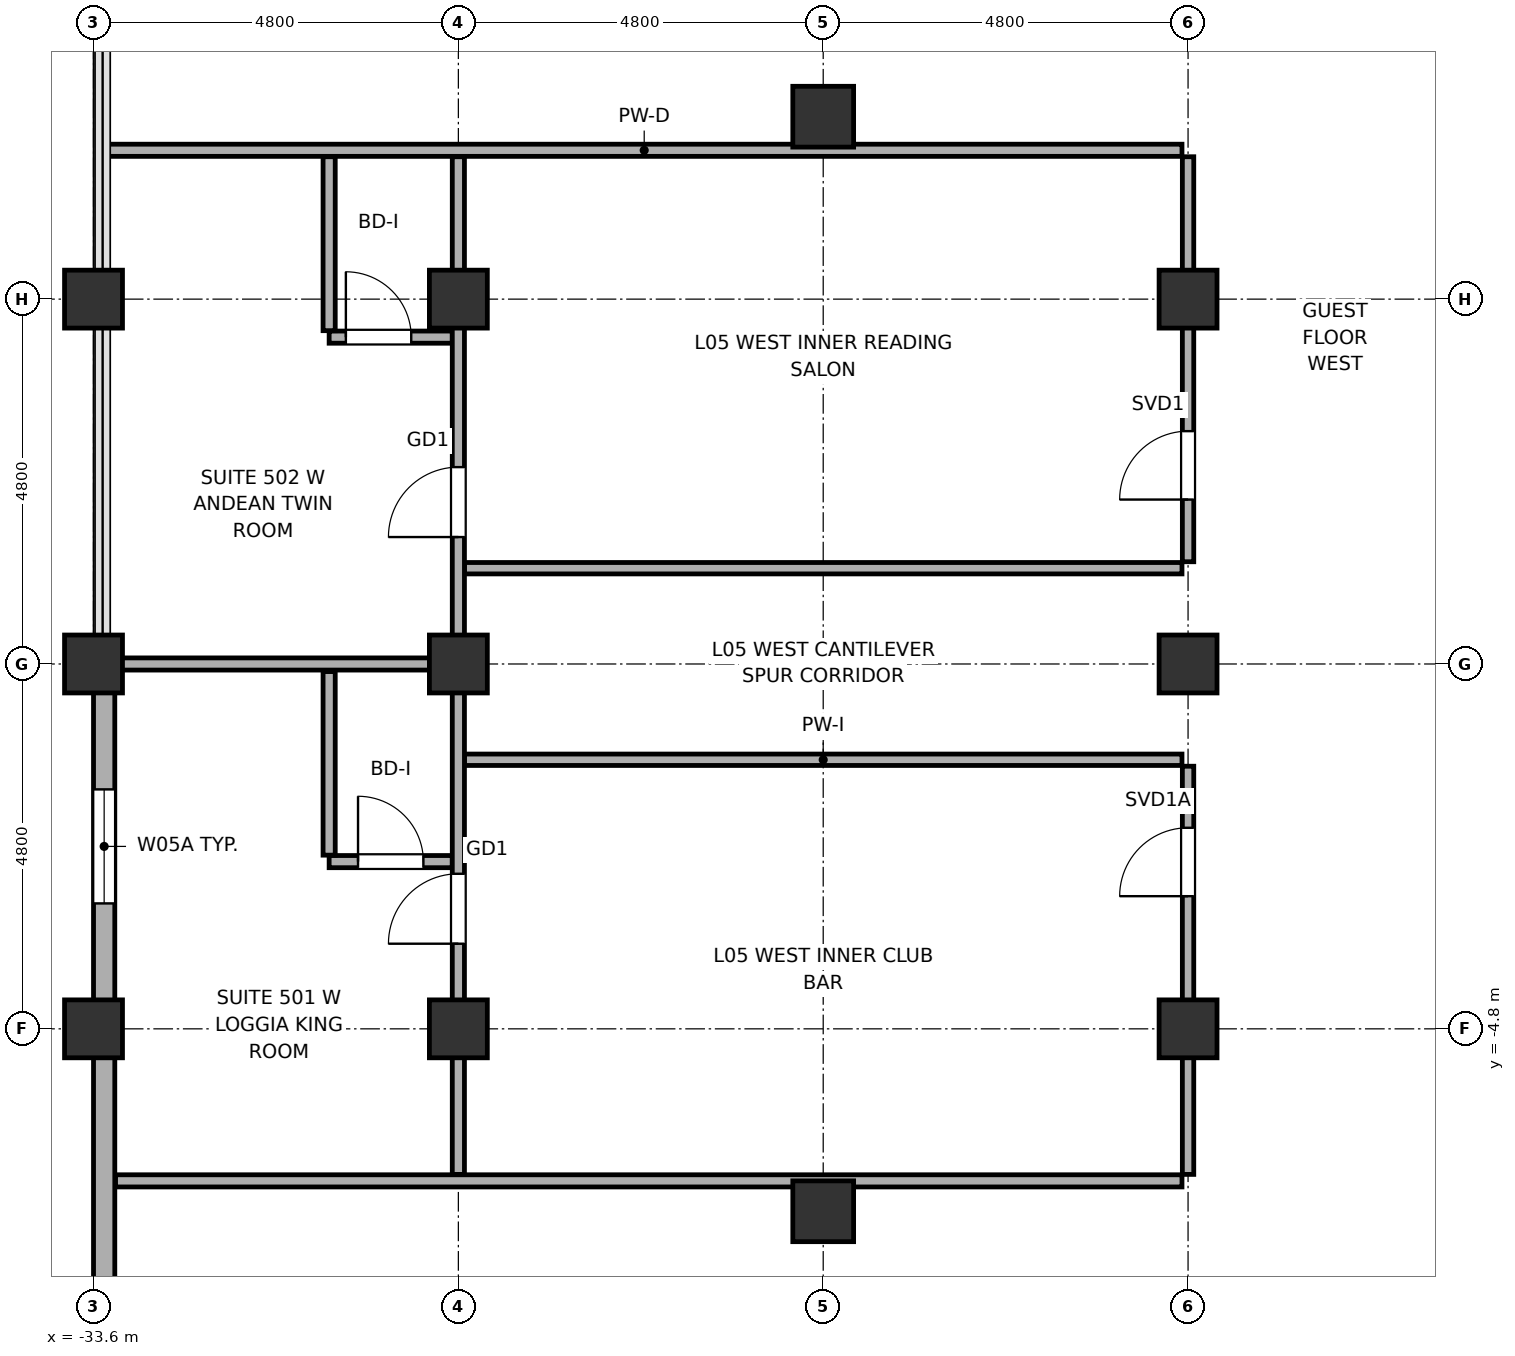
"""IFC4 building model, lengths in metres.
Left out: names, types, materials, properties, quantities, classifications, styles, units other than length and angle.
Written with IfcOpenShell. Run it as: python <this file> out.ifc"""

import sys

from ifc_helpers import new_model, si_unit, direction, frame, frame_2d, origin, origin_2d, place, context, subcontext, project, spatial, rectangle, hollow_rectangle, hollow_circle, extrude, element, fill, save


model = new_model("IFC4")
c1 = context("Model", 3, precision=1e-05, world=origin(), true_north=direction((0.0, 1.0)))
c2 = subcontext(c1, "Body", "Model", "MODEL_VIEW")
j1 = project(units=[si_unit("LENGTHUNIT", "METRE"), si_unit("PLANEANGLEUNIT", "RADIAN")], contexts=[c1])
p1 = place(None, origin())
s1 = spatial("IfcSite", under=j1, at=p1, CompositionType="ELEMENT")
p2 = place(p1, origin())
s2 = spatial("IfcBuilding", under=s1, at=p2, CompositionType="ELEMENT")
p3 = place(p2, frame((0.0, 0.0, 30.0)))
s3 = spatial("IfcBuildingStorey", under=s2, at=p3, CompositionType="ELEMENT", Elevation=30.0)
for number, where, z_axis, x_axis in (
    (1, (-33.6, -4.8, -0.18), (0.0, 0.0, 1.0), (1.0, 0.0, 0.0)),
    (2, (-33.6, 0.0, -0.18), (0.0, 0.0, 1.0), (1.0, 0.0, 0.0)),
    (3, (-33.6, 4.8, -0.18), (0.0, 0.0, 1.0), (1.0, 0.0, 0.0)),
):
    element("IfcColumn", number, at=place(p3, frame(where, z_axis=z_axis, x_axis=x_axis)), inside=s3, PredefinedType="COLUMN", context=c2, shape_type="SweptSolid", body=[
        extrude(hollow_circle(Radius=0.381, WallThickness=0.032, at=origin_2d()), origin(), (0.0, 0.0, 1.0), 3.88),
    ])
for number, where, z_axis, x_axis in (
    (4, (-28.8, -4.8, 0.0), (0.0, 0.0, 1.0), (1.0, 0.0, 0.0)),
    (5, (-28.8, 0.0, 0.0), (0.0, 0.0, 1.0), (1.0, 0.0, 0.0)),
    (6, (-28.8, 4.8, 0.0), (0.0, 0.0, 1.0), (1.0, 0.0, 0.0)),
):
    element("IfcColumn", number, at=place(p3, frame(where, z_axis=z_axis, x_axis=x_axis)), inside=s3, PredefinedType="COLUMN", context=c2, shape_type="SweptSolid", body=[
        extrude(hollow_circle(Radius=0.381, WallThickness=0.032, at=origin_2d()), origin(), (0.0, 0.0, 1.0), 3.7),
    ])
for number, where, z_axis, x_axis in (
    (7, (-24.0, -7.2, 0.0), (0.0, 0.0, 1.0), (1.0, 0.0, 0.0)),
    (8, (-24.0, 7.2, 0.0), (0.0, 0.0, 1.0), (1.0, 0.0, 0.0)),
):
    element("IfcColumn", number, at=place(p3, frame(where, z_axis=z_axis, x_axis=x_axis)), inside=s3, PredefinedType="COLUMN", context=c2, shape_type="SweptSolid", body=[
        extrude(hollow_rectangle(XDim=0.8, YDim=0.8, WallThickness=0.036, at=origin_2d()), origin(), (0.0, 0.0, 1.0), 3.7),
    ])
for number, where, z_axis, x_axis in (
    (9, (-19.2, -4.8, 0.0), (0.0, 0.0, 1.0), (1.0, 0.0, 0.0)),
    (10, (-19.2, 0.0, 0.0), (0.0, 0.0, 1.0), (1.0, 0.0, 0.0)),
    (11, (-19.2, 4.8, 0.0), (0.0, 0.0, 1.0), (1.0, 0.0, 0.0)),
):
    element("IfcColumn", number, at=place(p3, frame(where, z_axis=z_axis, x_axis=x_axis)), inside=s3, PredefinedType="COLUMN", context=c2, shape_type="SweptSolid", body=[
        extrude(hollow_circle(Radius=0.381, WallThickness=0.032, at=origin_2d()), origin(), (0.0, 0.0, 1.0), 3.7),
    ])
p4 = place(p3, frame((-33.46, -20.4, 0.0), z_axis=(0.0, 0.0, 1.0), x_axis=(0.0, 1.0, 0.0)))
e12 = element("IfcWall", 12, at=p4, inside=s3, PredefinedType="SOLIDWALL", context=c2, shape_type="SweptSolid", body=[
    extrude(rectangle(XDim=20.38, YDim=0.28, at=frame_2d((10.19, 0.0))), origin(), (0.0, 0.0, 1.0), 2.12),
])
p5 = place(p4, frame((17.25, 0.0, 0.75)))
e13 = element("IfcOpeningElement", 13, at=p5, cuts=e12, PredefinedType="OPENING", context=c2, shape_type="SweptSolid", body=[
    extrude(rectangle(XDim=1.5, YDim=1.15, at=frame_2d((0.75, 0.575))), frame((0.0, 0.155, 0.0), z_axis=(0.0, -1.0, 0.0), x_axis=(1.0, 0.0, 0.0)), (0.0, 0.0, 1.0), 0.31),
])
p6 = place(p3, frame((-33.31, -6.8, 0.0), z_axis=(0.0, 0.0, 1.0), x_axis=(1.0, 0.0, 0.0)))
e14 = element("IfcWall", 14, at=p6, inside=s3, PredefinedType="PARTITIONING", context=c2, shape_type="SweptSolid", body=[
    extrude(rectangle(XDim=14.03, YDim=0.16, at=frame_2d((7.015, 0.0))), origin(), (0.0, 0.0, 1.0), 2.12),
])
p7 = place(p3, frame((-30.5, -2.6, 0.0), z_axis=(0.0, 0.0, 1.0), x_axis=(1.0, 0.0, 0.0)))
e15 = element("IfcWall", 15, at=p7, inside=s3, PredefinedType="PARTITIONING", context=c2, shape_type="SweptSolid", body=[
    extrude(rectangle(XDim=1.62, YDim=0.16, at=frame_2d((0.81, 0.0))), origin(), (0.0, 0.0, 1.0), 2.82),
])
p8 = place(p7, frame((0.38, 0.0, 0.0)))
e16 = element("IfcOpeningElement", 16, at=p8, cuts=e15, PredefinedType="OPENING", context=c2, shape_type="SweptSolid", body=[
    extrude(rectangle(XDim=0.86, YDim=2.1, at=frame_2d((0.43, 1.05))), frame((0.0, 0.095, 0.0), z_axis=(0.0, -1.0, 0.0), x_axis=(1.0, 0.0, 0.0)), (0.0, 0.0, 1.0), 0.19),
])
p9 = place(p3, frame((-28.72, -1.26, 0.0), z_axis=(0.0, 0.0, 1.0), x_axis=(1.0, 0.0, 0.0)))
e17 = element("IfcWall", 17, at=p9, inside=s3, PredefinedType="PARTITIONING", context=c2, shape_type="SweptSolid", body=[
    extrude(rectangle(XDim=9.44, YDim=0.15, at=frame_2d((4.72, 0.0))), origin(), (0.0, 0.0, 1.0), 2.82),
])
p10 = place(p3, frame((-33.43, 0.0, 0.0), z_axis=(0.0, 0.0, 1.0), x_axis=(1.0, 0.0, 0.0)))
e18 = element("IfcWall", 18, at=p10, inside=s3, PredefinedType="PARTITIONING", context=c2, shape_type="SweptSolid", body=[
    extrude(rectangle(XDim=4.55, YDim=0.16, at=frame_2d((2.275, 0.0))), origin(), (0.0, 0.0, 1.0), 2.82),
])
p11 = place(p3, frame((-28.72, 1.26, 0.0), z_axis=(0.0, 0.0, 1.0), x_axis=(1.0, 0.0, 0.0)))
e19 = element("IfcWall", 19, at=p11, inside=s3, PredefinedType="PARTITIONING", context=c2, shape_type="SweptSolid", body=[
    extrude(rectangle(XDim=9.44, YDim=0.15, at=frame_2d((4.72, 0.0))), origin(), (0.0, 0.0, 1.0), 2.82),
])
p12 = place(p3, frame((-30.5, 4.3, 0.0), z_axis=(0.0, 0.0, 1.0), x_axis=(1.0, 0.0, 0.0)))
e20 = element("IfcWall", 20, at=p12, inside=s3, PredefinedType="PARTITIONING", context=c2, shape_type="SweptSolid", body=[
    extrude(rectangle(XDim=1.62, YDim=0.16, at=frame_2d((0.81, 0.0))), origin(), (0.0, 0.0, 1.0), 2.82),
])
p13 = place(p12, frame((0.22, 0.0, 0.0)))
e21 = element("IfcOpeningElement", 21, at=p13, cuts=e20, PredefinedType="OPENING", context=c2, shape_type="SweptSolid", body=[
    extrude(rectangle(XDim=0.86, YDim=2.1, at=frame_2d((0.43, 1.05))), frame((0.0, 0.095, 0.0), z_axis=(0.0, -1.0, 0.0), x_axis=(1.0, 0.0, 0.0)), (0.0, 0.0, 1.0), 0.19),
])
p14 = place(p3, frame((-33.43, 6.758, 0.0), z_axis=(0.0, 0.0, 1.0), x_axis=(1.0, 0.0, 0.0)))
e22 = element("IfcWall", 22, at=p14, inside=s3, PredefinedType="PARTITIONING", context=c2, shape_type="SweptSolid", body=[
    extrude(rectangle(XDim=14.15, YDim=0.16, at=frame_2d((7.075, 0.0))), origin(), (0.0, 0.0, 1.0), 2.12),
])
p15 = place(p3, frame((-30.5, -2.515, 0.0), z_axis=(0.0, 0.0, 1.0), x_axis=(0.0, 1.0, 0.0)))
e23 = element("IfcWall", 23, at=p15, inside=s3, PredefinedType="PARTITIONING", context=c2, shape_type="SweptSolid", body=[
    extrude(rectangle(XDim=2.415, YDim=0.16, at=frame_2d((1.208, 0.0))), origin(), (0.0, 0.0, 1.0), 3.52),
])
p16 = place(p3, frame((-30.5, 4.385, 0.0), z_axis=(0.0, 0.0, 1.0), x_axis=(0.0, 1.0, 0.0)))
e24 = element("IfcWall", 24, at=p16, inside=s3, PredefinedType="PARTITIONING", context=c2, shape_type="SweptSolid", body=[
    extrude(rectangle(XDim=2.288, YDim=0.16, at=frame_2d((1.144, 0.0))), origin(), (0.0, 0.0, 1.0), 3.52),
])
p17 = place(p3, frame((-28.8, -6.715, 0.0), z_axis=(0.0, 0.0, 1.0), x_axis=(0.0, 1.0, 0.0)))
e25 = element("IfcWall", 25, at=p17, inside=s3, PredefinedType="PARTITIONING", context=c2, shape_type="SweptSolid", body=[
    extrude(rectangle(XDim=13.388, YDim=0.16, at=frame_2d((6.694, 0.0))), origin(), (0.0, 0.0, 1.0), 2.82),
])
p18 = place(p17, frame((3.035, 0.0, 0.0)))
e26 = element("IfcOpeningElement", 26, at=p18, cuts=e25, PredefinedType="OPENING", context=c2, shape_type="SweptSolid", body=[
    extrude(rectangle(XDim=0.92, YDim=2.15, at=frame_2d((0.46, 1.075))), frame((0.0, 0.095, 0.0), z_axis=(0.0, -1.0, 0.0), x_axis=(1.0, 0.0, 0.0)), (0.0, 0.0, 1.0), 0.19),
])
p19 = place(p17, frame((8.385, 0.0, 0.0)))
e27 = element("IfcOpeningElement", 27, at=p19, cuts=e25, PredefinedType="OPENING", context=c2, shape_type="SweptSolid", body=[
    extrude(rectangle(XDim=0.92, YDim=2.15, at=frame_2d((0.46, 1.075))), frame((0.0, 0.095, 0.0), z_axis=(0.0, -1.0, 0.0), x_axis=(1.0, 0.0, 0.0)), (0.0, 0.0, 1.0), 0.19),
])
p20 = place(p3, frame((-19.2, -6.715, 0.0), z_axis=(0.0, 0.0, 1.0), x_axis=(0.0, 1.0, 0.0)))
e28 = element("IfcWall", 28, at=p20, inside=s3, PredefinedType="PARTITIONING", context=c2, shape_type="SweptSolid", body=[
    extrude(rectangle(XDim=5.37, YDim=0.15, at=frame_2d((2.685, 0.0))), origin(), (0.0, 0.0, 1.0), 2.12),
])
p21 = place(p20, frame((3.66, 0.0, 0.0)))
e29 = element("IfcOpeningElement", 29, at=p21, cuts=e28, PredefinedType="OPENING", context=c2, shape_type="SweptSolid", body=[
    extrude(rectangle(XDim=0.9, YDim=2.02, at=frame_2d((0.45, 1.01))), frame((0.0, 0.09, 0.0), z_axis=(0.0, -1.0, 0.0), x_axis=(1.0, 0.0, 0.0)), (0.0, 0.0, 1.0), 0.18),
])
p22 = place(p3, frame((-19.2, 1.345, 0.0), z_axis=(0.0, 0.0, 1.0), x_axis=(0.0, 1.0, 0.0)))
e30 = element("IfcWall", 30, at=p22, inside=s3, PredefinedType="PARTITIONING", context=c2, shape_type="SweptSolid", body=[
    extrude(rectangle(XDim=5.328, YDim=0.15, at=frame_2d((2.664, 0.0))), origin(), (0.0, 0.0, 1.0), 2.82),
])
p23 = place(p22, frame((0.818, 0.0, 0.0)))
e31 = element("IfcOpeningElement", 31, at=p23, cuts=e30, PredefinedType="OPENING", context=c2, shape_type="SweptSolid", body=[
    extrude(rectangle(XDim=0.9, YDim=2.1, at=frame_2d((0.45, 1.05))), frame((0.0, 0.09, 0.0), z_axis=(0.0, -1.0, 0.0), x_axis=(1.0, 0.0, 0.0)), (0.0, 0.0, 1.0), 0.18),
])
p24 = place(p5, origin())
e32 = element("IfcWindow", 32, at=p24, inside=s3, PartitioningType="SINGLE_PANEL", PredefinedType="WINDOW", context=c2, shape_type="SweptSolid", body=[
    extrude(rectangle(XDim=1.5, YDim=1.15, at=frame_2d((0.75, 0.575))), frame((0.0, 0.03, 0.0), z_axis=(0.0, -1.0, 0.0), x_axis=(1.0, 0.0, 0.0)), (0.0, 0.0, 1.0), 0.06),
])
fill(e13, e32)
p25 = place(p21, origin())
e33 = element("IfcDoor", 33, at=p25, inside=s3, OperationType="SINGLE_SWING_LEFT", PredefinedType="DOOR", context=c2, shape_type="SweptSolid", body=[
    extrude(rectangle(XDim=0.9, YDim=2.02, at=frame_2d((0.45, 1.01))), frame((0.0, 0.025, 0.0), z_axis=(0.0, -1.0, 0.0), x_axis=(1.0, 0.0, 0.0)), (0.0, 0.0, 1.0), 0.05),
])
fill(e29, e33)
p26 = place(p23, origin())
e34 = element("IfcDoor", 34, at=p26, inside=s3, OperationType="SINGLE_SWING_LEFT", PredefinedType="DOOR", context=c2, shape_type="SweptSolid", body=[
    extrude(rectangle(XDim=0.9, YDim=2.1, at=frame_2d((0.45, 1.05))), frame((0.0, 0.025, 0.0), z_axis=(0.0, -1.0, 0.0), x_axis=(1.0, 0.0, 0.0)), (0.0, 0.0, 1.0), 0.05),
])
fill(e31, e34)
p27 = place(p18, origin())
e35 = element("IfcDoor", 35, at=p27, inside=s3, OperationType="SINGLE_SWING_RIGHT", PredefinedType="DOOR", context=c2, shape_type="SweptSolid", body=[
    extrude(rectangle(XDim=0.92, YDim=2.15, at=frame_2d((0.46, 1.075))), frame((0.0, 0.025, 0.0), z_axis=(0.0, -1.0, 0.0), x_axis=(1.0, 0.0, 0.0)), (0.0, 0.0, 1.0), 0.05),
])
fill(e26, e35)
p28 = place(p8, origin())
e36 = element("IfcDoor", 36, at=p28, inside=s3, OperationType="SINGLE_SWING_RIGHT", PredefinedType="DOOR", context=c2, shape_type="SweptSolid", body=[
    extrude(rectangle(XDim=0.86, YDim=2.1, at=frame_2d((0.43, 1.05))), frame((0.0, 0.025, 0.0), z_axis=(0.0, -1.0, 0.0), x_axis=(1.0, 0.0, 0.0)), (0.0, 0.0, 1.0), 0.05),
])
fill(e16, e36)
p29 = place(p19, origin())
e37 = element("IfcDoor", 37, at=p29, inside=s3, OperationType="SINGLE_SWING_LEFT", PredefinedType="DOOR", context=c2, shape_type="SweptSolid", body=[
    extrude(rectangle(XDim=0.92, YDim=2.15, at=frame_2d((0.46, 1.075))), frame((0.0, 0.025, 0.0), z_axis=(0.0, -1.0, 0.0), x_axis=(1.0, 0.0, 0.0)), (0.0, 0.0, 1.0), 0.05),
])
fill(e27, e37)
p30 = place(p13, origin())
e38 = element("IfcDoor", 38, at=p30, inside=s3, OperationType="SINGLE_SWING_LEFT", PredefinedType="DOOR", context=c2, shape_type="SweptSolid", body=[
    extrude(rectangle(XDim=0.86, YDim=2.1, at=frame_2d((0.43, 1.05))), frame((0.0, 0.025, 0.0), z_axis=(0.0, -1.0, 0.0), x_axis=(1.0, 0.0, 0.0)), (0.0, 0.0, 1.0), 0.05),
])
fill(e21, e38)
save(model, sys.argv[1])
